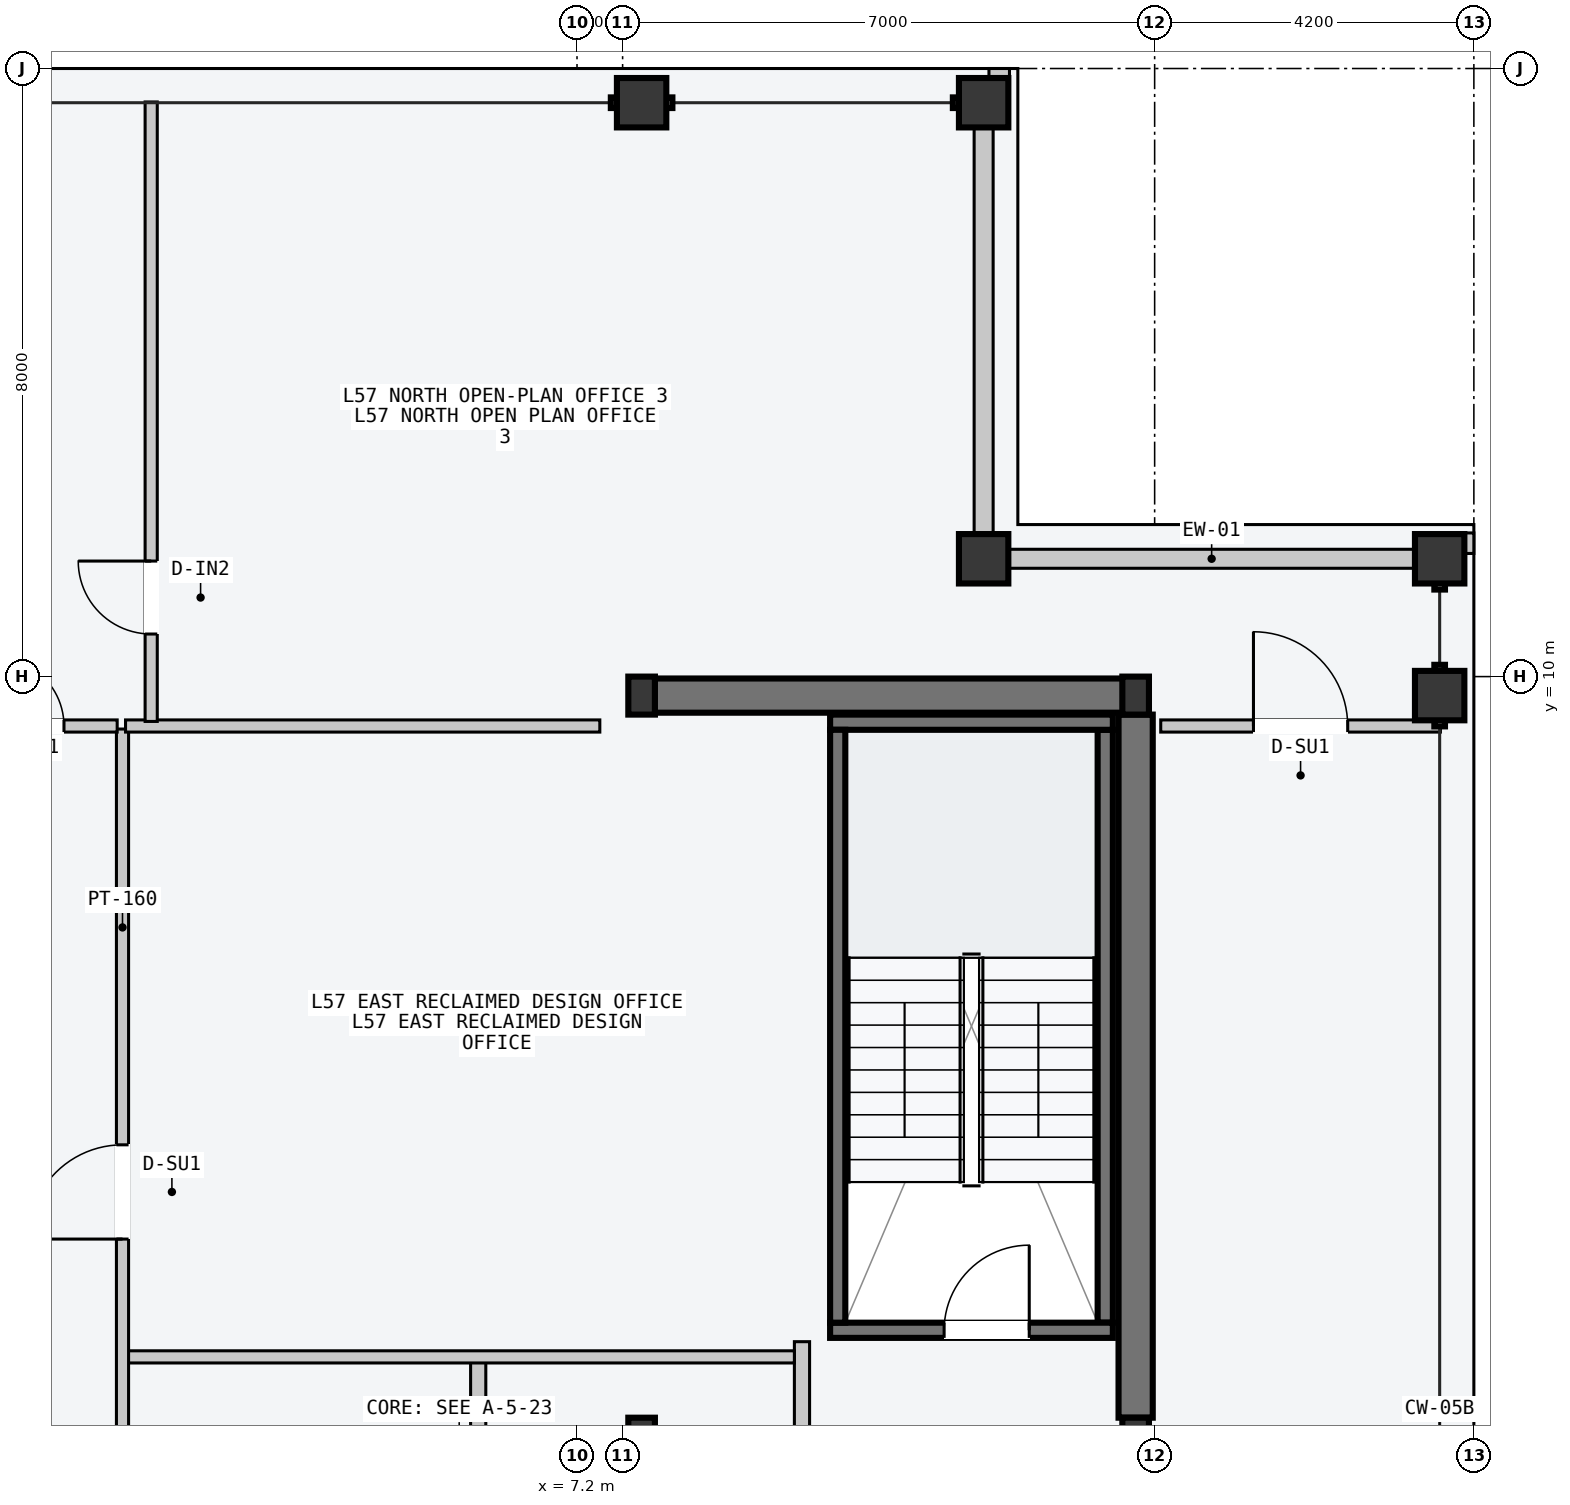
"""IFC4 building model, lengths in metres.
Left out: names, types, materials, properties, quantities, classifications, styles, units other than length and angle.
Written with IfcOpenShell. Run it as: python <this file> out.ifc"""

import sys

from ifc_helpers import new_model, si_unit, direction, frame, frame_2d, origin, origin_2d, place, context, subcontext, project, spatial, rectangle, hollow_rectangle, i_section, extrude, element, fill, save


model = new_model("IFC4")
c1 = context("Model", 3, precision=1e-05, world=origin(), true_north=direction((0.0, 1.0)))
c2 = subcontext(c1, "Body", "Model", "MODEL_VIEW")
j1 = project(units=[si_unit("LENGTHUNIT", "METRE"), si_unit("PLANEANGLEUNIT", "RADIAN")], contexts=[c1])
p1 = place(None, origin())
s1 = spatial("IfcSite", under=j1, at=p1, CompositionType="ELEMENT")
p2 = place(p1, origin())
s2 = spatial("IfcBuilding", under=s1, at=p2, CompositionType="ELEMENT")
p3 = place(p2, frame((0.0, 0.0, 218.4)))
s3 = spatial("IfcBuildingStorey", under=s2, at=p3, CompositionType="ELEMENT", Elevation=218.4)
p4 = place(p3, frame((8.07, 9.75, -0.2), z_axis=(0.0, 0.0, 1.0), x_axis=(1.0, 0.0, 0.0)))
e1 = element("IfcWall", 1, at=p4, inside=s3, PredefinedType="SHEAR", context=c2, shape_type="SweptSolid", body=[
    extrude(rectangle(XDim=6.46, YDim=0.45, at=frame_2d((3.23, 0.0))), origin(), (0.0, 0.0, 1.0), 3.6),
])
p5 = place(p3, frame((14.55, 0.25, -0.2), z_axis=(0.0, 0.0, 1.0), x_axis=(0.0, 1.0, 0.0)))
e2 = element("IfcWall", 2, at=p5, inside=s3, PredefinedType="SHEAR", context=c2, shape_type="SweptSolid", body=[
    extrude(rectangle(XDim=9.25, YDim=0.45, at=frame_2d((4.625, 0.0))), origin(), (0.0, 0.0, 1.0), 3.6),
])
p6 = place(p3, frame((14.15, 1.5, -0.2), z_axis=(0.0, 0.0, 1.0), x_axis=(0.0, 1.0, 0.0)))
e3 = element("IfcWall", 3, at=p6, inside=s3, PredefinedType="SOLIDWALL", context=c2, shape_type="SweptSolid", body=[
    extrude(rectangle(XDim=7.8, YDim=0.2, at=frame_2d((3.9, 0.0))), origin(), (0.0, 0.0, 1.0), 3.6),
])
p7 = place(p3, frame((10.53, 1.4, -0.2), z_axis=(0.0, 0.0, 1.0), x_axis=(1.0, 0.0, 0.0)))
e4 = element("IfcWall", 4, at=p7, inside=s3, PredefinedType="SOLIDWALL", context=c2, shape_type="SweptSolid", body=[
    extrude(rectangle(XDim=3.72, YDim=0.2, at=frame_2d((1.86, 0.0))), origin(), (0.0, 0.0, 1.0), 3.6),
])
p8 = place(p7, frame((1.5, 0.0, 0.2)))
e5 = element("IfcOpeningElement", 5, at=p8, cuts=e4, PredefinedType="OPENING", context=c2, shape_type="SweptSolid", body=[
    extrude(rectangle(XDim=1.12, YDim=2.18, at=frame_2d((0.56, 1.09))), frame((0.0, 0.11, 0.0), z_axis=(0.0, -1.0, 0.0), x_axis=(1.0, 0.0, 0.0)), (0.0, 0.0, 1.0), 0.22),
])
p9 = place(p3, frame((10.53, 9.4, -0.2), z_axis=(0.0, 0.0, 1.0), x_axis=(1.0, 0.0, 0.0)))
e6 = element("IfcWall", 6, at=p9, inside=s3, PredefinedType="SOLIDWALL", context=c2, shape_type="SweptSolid", body=[
    extrude(rectangle(XDim=3.72, YDim=0.2, at=frame_2d((1.86, 0.0))), origin(), (0.0, 0.0, 1.0), 3.6),
])
p10 = place(p3, frame((10.63, 1.5, -0.2), z_axis=(0.0, 0.0, 1.0), x_axis=(0.0, 1.0, 0.0)))
e7 = element("IfcWall", 7, at=p10, inside=s3, PredefinedType="SOLIDWALL", context=c2, shape_type="SweptSolid", body=[
    extrude(rectangle(XDim=7.8, YDim=0.2, at=frame_2d((3.9, 0.0))), origin(), (0.0, 0.0, 1.0), 3.6),
])
for number, where, z_axis, x_axis in (
    (8, (8.05, 0.0, 0.0), (0.0, 0.0, 1.0), (1.0, 0.0, 0.0)),
    (9, (8.05, 9.75, 0.0), (0.0, 0.0, 1.0), (1.0, 0.0, 0.0)),
    (10, (14.55, 0.0, 0.0), (0.0, 0.0, 1.0), (1.0, 0.0, 0.0)),
    (11, (14.55, 9.75, 0.0), (0.0, 0.0, 1.0), (1.0, 0.0, 0.0)),
):
    element("IfcColumn", number, at=place(p3, frame(where, z_axis=z_axis, x_axis=x_axis)), inside=s3, PredefinedType="COLUMN", context=c2, shape_type="SweptSolid", body=[
        extrude(i_section(OverallWidth=0.35, OverallDepth=0.5, WebThickness=0.02, FlangeThickness=0.032, at=origin_2d()), origin(), (0.0, 0.0, 1.0), 3.6),
    ])
for number, where, z_axis, x_axis in (
    (12, (8.05, 17.55, 0.0), (0.0, 0.0, 1.0), (1.0, 0.0, 0.0)),
    (13, (12.55, 17.55, 0.0), (0.0, 0.0, 1.0), (1.0, 0.0, 0.0)),
    (14, (18.55, 9.75, 0.0), (0.0, 0.0, 1.0), (0.0, 1.0, 0.0)),
    (15, (18.55, 11.55, 0.0), (0.0, 0.0, 1.0), (0.0, 1.0, 0.0)),
    (16, (12.55, 11.55, 0.0), (0.0, 0.0, 1.0), (1.0, 0.0, 0.0)),
):
    element("IfcColumn", number, at=place(p3, frame(where, z_axis=z_axis, x_axis=x_axis)), inside=s3, PredefinedType="COLUMN", context=c2, shape_type="SweptSolid", body=[
        extrude(hollow_rectangle(XDim=0.65, YDim=0.65, WallThickness=0.028, at=origin_2d()), origin(), (0.0, 0.0, 1.0), 3.6),
    ])
for number, where, z_axis, x_axis in (
    (17, (12.885, 11.55, 0.0), (0.0, 0.0, 1.0), (1.0, 0.0, 0.0)),
    (18, (12.55, 11.885, 0.0), (0.0, 0.0, 1.0), (0.0, 1.0, 0.0)),
):
    element("IfcWall", number, at=place(p3, frame(where, z_axis=z_axis, x_axis=x_axis)), inside=s3, PredefinedType="STANDARD", context=c2, shape_type="SweptSolid", body=[
        extrude(rectangle(XDim=5.33, YDim=0.25, at=frame_2d((2.665, 0.0))), origin(), (0.0, 0.0, 1.0), 2.85),
    ])
for number, where, z_axis, x_axis in (
    (19, (12.62, 17.89, 0.0), (0.0, 0.0, 1.0), (1.0, 0.0, 0.0)),
    (20, (18.89, 11.62, 0.0), (0.0, 0.0, 1.0), (0.0, 1.0, 0.0)),
):
    element("IfcWall", number, at=place(p3, frame(where, z_axis=z_axis, x_axis=x_axis)), inside=s3, PredefinedType="PARAPET", context=c2, shape_type="SweptSolid", body=[
        extrude(rectangle(XDim=0.27, YDim=0.22, at=frame_2d((0.135, 0.0))), origin(), (0.0, 0.0, 1.0), 1.2),
    ])
p11 = place(p3, frame((5.9, -9.45, 0.0), z_axis=(0.0, 0.0, 1.0), x_axis=(0.0, 1.0, 0.0)))
e21 = element("IfcWall", 21, at=p11, inside=s3, PredefinedType="PARTITIONING", context=c2, shape_type="SweptSolid", body=[
    extrude(rectangle(XDim=10.5, YDim=0.2, at=frame_2d((5.25, 0.0))), origin(), (0.0, 0.0, 1.0), 3.4),
])
p12 = place(p11, frame((3.9, 0.0, 0.0)))
e22 = element("IfcOpeningElement", 22, at=p12, cuts=e21, PredefinedType="OPENING", context=c2, shape_type="SweptSolid", body=[
    extrude(rectangle(XDim=1.5, YDim=2.2, at=frame_2d((0.75, 1.1))), frame((0.0, 0.11, 0.0), z_axis=(0.0, -1.0, 0.0), x_axis=(1.0, 0.0, 0.0)), (0.0, 0.0, 1.0), 0.22),
])
p13 = place(p3, frame((10.16, -2.55, 0.0), z_axis=(0.0, 0.0, 1.0), x_axis=(0.0, 1.0, 0.0)))
e23 = element("IfcWall", 23, at=p13, inside=s3, PredefinedType="PARTITIONING", context=c2, shape_type="SweptSolid", body=[
    extrude(rectangle(XDim=3.8, YDim=0.2, at=frame_2d((1.9, 0.0))), origin(), (0.0, 0.0, 1.0), 3.4),
])
p14 = place(p13, frame((1.3, 0.0, 0.0)))
e24 = element("IfcOpeningElement", 24, at=p14, cuts=e23, PredefinedType="OPENING", context=c2, shape_type="SweptSolid", body=[
    extrude(rectangle(XDim=1.1, YDim=2.15, at=frame_2d((0.55, 1.075))), frame((0.0, 0.11, 0.0), z_axis=(0.0, -1.0, 0.0), x_axis=(1.0, 0.0, 0.0)), (0.0, 0.0, 1.0), 0.22),
])
p15 = place(p3, frame((1.26, 1.05, 0.0), z_axis=(0.0, 0.0, 1.0), x_axis=(1.0, 0.0, 0.0)))
e25 = element("IfcWall", 25, at=p15, inside=s3, PredefinedType="PARTITIONING", context=c2, shape_type="SweptSolid", body=[
    extrude(rectangle(XDim=8.8, YDim=0.16, at=frame_2d((4.4, 0.0))), origin(), (0.0, 0.0, 1.0), 3.4),
])
p16 = place(p3, frame((1.22, -3.5, 0.0), z_axis=(0.0, 0.0, 1.0), x_axis=(0.0, 1.0, 0.0)))
e26 = element("IfcWall", 26, at=p16, inside=s3, PredefinedType="PARTITIONING", context=c2, shape_type="SweptSolid", body=[
    extrude(rectangle(XDim=12.81, YDim=0.16, at=frame_2d((6.405, 0.0))), origin(), (0.0, 0.0, 1.0), 3.4),
])
p17 = place(p16, frame((6.1, 0.0, 0.0)))
e27 = element("IfcOpeningElement", 27, at=p17, cuts=e26, PredefinedType="OPENING", context=c2, shape_type="SweptSolid", body=[
    extrude(rectangle(XDim=1.24, YDim=2.24, at=frame_2d((0.62, 1.12))), frame((0.0, 0.09, 0.0), z_axis=(0.0, -1.0, 0.0), x_axis=(1.0, 0.0, 0.0)), (0.0, 0.0, 1.0), 0.18),
])
p18 = place(p16, frame((1.6, 0.0, 0.0)))
e28 = element("IfcOpeningElement", 28, at=p18, cuts=e26, PredefinedType="OPENING", context=c2, shape_type="SweptSolid", body=[
    extrude(rectangle(XDim=0.96, YDim=2.18, at=frame_2d((0.48, 1.09))), frame((0.0, 0.09, 0.0), z_axis=(0.0, -1.0, 0.0), x_axis=(1.0, 0.0, 0.0)), (0.0, 0.0, 1.0), 0.18),
])
p19 = place(p3, frame((1.26, 9.35, 0.0), z_axis=(0.0, 0.0, 1.0), x_axis=(1.0, 0.0, 0.0)))
e29 = element("IfcWall", 29, at=p19, inside=s3, PredefinedType="PARTITIONING", context=c2, shape_type="SweptSolid", body=[
    extrude(rectangle(XDim=6.24, YDim=0.16, at=frame_2d((3.12, 0.0))), origin(), (0.0, 0.0, 1.0), 3.4),
])
p20 = place(p3, frame((1.597, 9.41, 0.0), z_axis=(0.0, 0.0, 1.0), x_axis=(0.0, 1.0, 0.0)))
e30 = element("IfcWall", 30, at=p20, inside=s3, PredefinedType="PARTITIONING", context=c2, shape_type="SweptSolid", body=[
    extrude(rectangle(XDim=8.15, YDim=0.16, at=frame_2d((4.075, 0.0))), origin(), (0.0, 0.0, 1.0), 3.4),
])
p21 = place(p20, frame((1.15, 0.0, 0.0)))
e31 = element("IfcOpeningElement", 31, at=p21, cuts=e30, PredefinedType="OPENING", context=c2, shape_type="SweptSolid", body=[
    extrude(rectangle(XDim=0.96, YDim=2.18, at=frame_2d((0.48, 1.09))), frame((0.0, 0.09, 0.0), z_axis=(0.0, -1.0, 0.0), x_axis=(1.0, 0.0, 0.0)), (0.0, 0.0, 1.0), 0.18),
])
p22 = place(p3, frame((-1.15, 9.35, 0.0), z_axis=(0.0, 0.0, 1.0), x_axis=(1.0, 0.0, 0.0)))
e32 = element("IfcWall", 32, at=p22, inside=s3, PredefinedType="PARTITIONING", context=c2, shape_type="SweptSolid", body=[
    extrude(rectangle(XDim=2.3, YDim=0.16, at=frame_2d((1.15, 0.0))), origin(), (0.0, 0.0, 1.0), 3.4),
])
p23 = place(p22, frame((0.7, 0.0, 0.0)))
e33 = element("IfcOpeningElement", 33, at=p23, cuts=e32, PredefinedType="OPENING", context=c2, shape_type="SweptSolid", body=[
    extrude(rectangle(XDim=0.9, YDim=2.15, at=frame_2d((0.45, 1.075))), frame((0.0, 0.09, 0.0), z_axis=(0.0, -1.0, 0.0), x_axis=(1.0, 0.0, 0.0)), (0.0, 0.0, 1.0), 0.18),
])
p24 = place(p3, frame((14.88, 9.35, 0.0), z_axis=(0.0, 0.0, 1.0), x_axis=(1.0, 0.0, 0.0)))
e34 = element("IfcWall", 34, at=p24, inside=s3, PredefinedType="PARTITIONING", context=c2, shape_type="SweptSolid", body=[
    extrude(rectangle(XDim=3.68, YDim=0.16, at=frame_2d((1.84, 0.0))), origin(), (0.0, 0.0, 1.0), 3.4),
])
p25 = place(p24, frame((1.22, 0.0, 0.0)))
e35 = element("IfcOpeningElement", 35, at=p25, cuts=e34, PredefinedType="OPENING", context=c2, shape_type="SweptSolid", body=[
    extrude(rectangle(XDim=1.24, YDim=2.24, at=frame_2d((0.62, 1.12))), frame((0.0, 0.09, 0.0), z_axis=(0.0, -1.0, 0.0), x_axis=(1.0, 0.0, 0.0)), (0.0, 0.0, 1.0), 0.18),
])
p26 = place(p8, origin())
e36 = element("IfcDoor", 36, at=p26, inside=s3, OperationType="SINGLE_SWING_RIGHT", PredefinedType="DOOR", context=c2, shape_type="SweptSolid", body=[
    extrude(rectangle(XDim=1.12, YDim=2.18, at=frame_2d((0.56, 1.09))), frame((0.0, 0.025, 0.0), z_axis=(0.0, -1.0, 0.0), x_axis=(1.0, 0.0, 0.0)), (0.0, 0.0, 1.0), 0.05),
])
fill(e5, e36)
p27 = place(p17, origin())
e37 = element("IfcDoor", 37, at=p27, inside=s3, OperationType="SINGLE_SWING_LEFT", PredefinedType="DOOR", context=c2, shape_type="SweptSolid", body=[
    extrude(rectangle(XDim=1.24, YDim=2.24, at=frame_2d((0.62, 1.12))), frame((0.0, 0.025, 0.0), z_axis=(0.0, -1.0, 0.0), x_axis=(1.0, 0.0, 0.0)), (0.0, 0.0, 1.0), 0.05),
])
fill(e27, e37)
p28 = place(p21, origin())
e38 = element("IfcDoor", 38, at=p28, inside=s3, OperationType="SINGLE_SWING_RIGHT", PredefinedType="DOOR", context=c2, shape_type="SweptSolid", body=[
    extrude(rectangle(XDim=0.96, YDim=2.18, at=frame_2d((0.48, 1.09))), frame((0.0, 0.025, 0.0), z_axis=(0.0, -1.0, 0.0), x_axis=(1.0, 0.0, 0.0)), (0.0, 0.0, 1.0), 0.05),
])
fill(e31, e38)
p29 = place(p23, origin())
e39 = element("IfcDoor", 39, at=p29, inside=s3, OperationType="SINGLE_SWING_LEFT", PredefinedType="DOOR", context=c2, shape_type="SweptSolid", body=[
    extrude(rectangle(XDim=0.9, YDim=2.15, at=frame_2d((0.45, 1.075))), frame((0.0, 0.025, 0.0), z_axis=(0.0, -1.0, 0.0), x_axis=(1.0, 0.0, 0.0)), (0.0, 0.0, 1.0), 0.05),
])
fill(e33, e39)
p30 = place(p25, origin())
e40 = element("IfcDoor", 40, at=p30, inside=s3, OperationType="SINGLE_SWING_LEFT", PredefinedType="DOOR", context=c2, shape_type="SweptSolid", body=[
    extrude(rectangle(XDim=1.24, YDim=2.24, at=frame_2d((0.62, 1.12))), frame((0.0, 0.025, 0.0), z_axis=(0.0, -1.0, 0.0), x_axis=(1.0, 0.0, 0.0)), (0.0, 0.0, 1.0), 0.05),
])
fill(e35, e40)
save(model, sys.argv[1])
